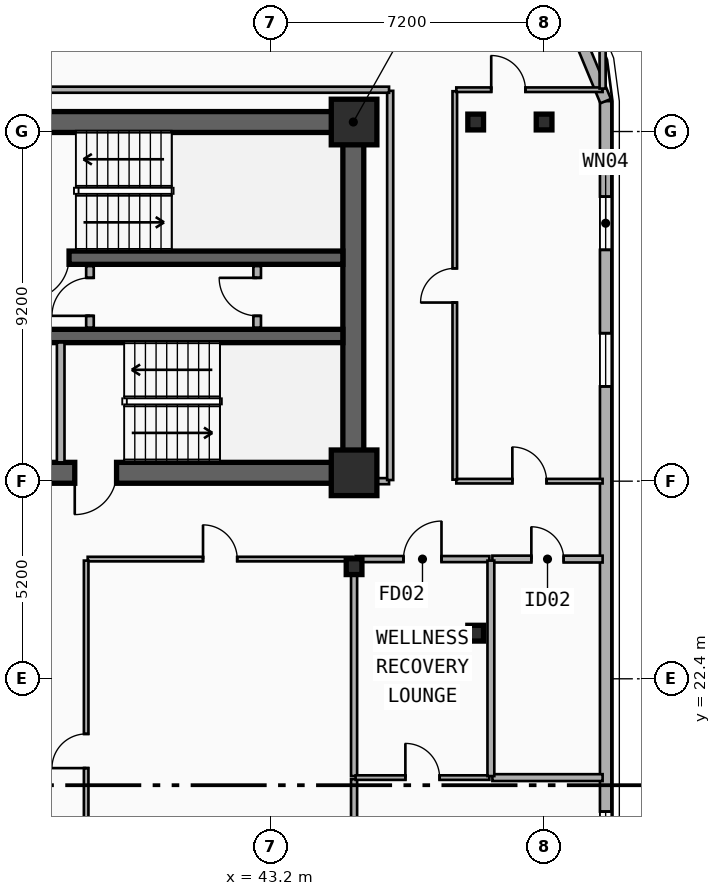
"""IFC4 building model, lengths in metres.
Left out: names, types, materials, properties, quantities, classifications, styles, units other than length and angle.
Written with IfcOpenShell. Run it as: python <this file> out.ifc"""

import sys

from ifc_helpers import new_model, si_unit, direction, frame, frame_2d, origin, origin_2d, place, context, subcontext, project, spatial, rectangle, i_section, extrude, element, fill, save


model = new_model("IFC4")
c1 = context("Model", 3, precision=1e-05, world=origin(), true_north=direction((0.0, 1.0)))
c2 = subcontext(c1, "Body", "Model", "MODEL_VIEW")
j1 = project(units=[si_unit("LENGTHUNIT", "METRE"), si_unit("PLANEANGLEUNIT", "RADIAN")], contexts=[c1])
p1 = place(None, origin())
s1 = spatial("IfcSite", under=j1, at=p1, CompositionType="ELEMENT")
p2 = place(p1, origin())
s2 = spatial("IfcBuilding", under=s1, at=p2, CompositionType="ELEMENT")
p3 = place(p2, frame((0.0, 0.0, 151.9)))
s3 = spatial("IfcBuildingStorey", under=s2, at=p3, CompositionType="ELEMENT", Elevation=151.9)
p4 = place(p3, frame((12.15, 37.05, 0.0), z_axis=(0.0, 0.0, 1.0), x_axis=(1.0, 0.0, 0.0)))
e1 = element("IfcWall", 1, at=p4, inside=s3, PredefinedType="SHEAR", context=c2, shape_type="SweptSolid", body=[
    extrude(rectangle(XDim=33.23, YDim=0.55, at=frame_2d((16.615, 0.0))), origin(), (0.0, 0.0, 1.0), 3.55),
])
p5 = place(p3, frame((45.38, 27.82, 0.0), z_axis=(0.0, 0.0, 1.0), x_axis=(-1.0, 0.0, 0.0)))
e2 = element("IfcWall", 2, at=p5, inside=s3, PredefinedType="SHEAR", context=c2, shape_type="SweptSolid", body=[
    extrude(rectangle(XDim=12.23, YDim=0.55, at=frame_2d((6.115, 0.0))), origin(), (0.0, 0.0, 1.0), 3.55),
])
p6 = place(p5, frame((9.93, 0.0, 0.0)))
e3 = element("IfcOpeningElement", 3, at=p6, cuts=e2, PredefinedType="OPENING", context=c2, shape_type="SweptSolid", body=[
    extrude(rectangle(XDim=1.1, YDim=2.15, at=frame_2d((0.55, 1.075))), frame((0.0, 0.285, 0.0), z_axis=(0.0, -1.0, 0.0), x_axis=(1.0, 0.0, 0.0)), (0.0, 0.0, 1.0), 0.57),
])
p7 = place(p5, frame((6.23, 0.0, 0.0)))
e4 = element("IfcOpeningElement", 4, at=p7, cuts=e2, PredefinedType="OPENING", context=c2, shape_type="SweptSolid", body=[
    extrude(rectangle(XDim=1.1, YDim=2.15, at=frame_2d((0.55, 1.075))), frame((0.0, 0.285, 0.0), z_axis=(0.0, -1.0, 0.0), x_axis=(1.0, 0.0, 0.0)), (0.0, 0.0, 1.0), 0.57),
])
p8 = place(p3, frame((45.38, 28.095, 0.0), z_axis=(0.0, 0.0, 1.0), x_axis=(0.0, 1.0, 0.0)))
e5 = element("IfcWall", 5, at=p8, inside=s3, PredefinedType="SHEAR", context=c2, shape_type="SweptSolid", body=[
    extrude(rectangle(XDim=8.68, YDim=0.55, at=frame_2d((4.34, 0.0))), origin(), (0.0, 0.0, 1.0), 3.55),
])
p9 = place(p3, frame((45.105, 33.48, 0.0), z_axis=(0.0, 0.0, 1.0), x_axis=(-1.0, 0.0, 0.0)))
e6 = element("IfcWall", 6, at=p9, inside=s3, PredefinedType="SHEAR", context=c2, shape_type="SweptSolid", body=[
    extrude(rectangle(XDim=8.55, YDim=0.35, at=frame_2d((4.275, 0.0))), origin(), (0.0, 0.0, 1.0), 3.55),
])
p10 = place(p9, frame((7.205, 0.0, 0.0)))
e7 = element("IfcOpeningElement", 7, at=p10, cuts=e6, PredefinedType="OPENING", context=c2, shape_type="SweptSolid", body=[
    extrude(rectangle(XDim=1.1, YDim=2.15, at=frame_2d((0.55, 1.075))), frame((0.0, 0.185, 0.0), z_axis=(0.0, -1.0, 0.0), x_axis=(1.0, 0.0, 0.0)), (0.0, 0.0, 1.0), 0.37),
])
p11 = place(p3, frame((36.555, 31.42, 0.0), z_axis=(0.0, 0.0, 1.0), x_axis=(1.0, 0.0, 0.0)))
e8 = element("IfcWall", 8, at=p11, inside=s3, PredefinedType="SHEAR", context=c2, shape_type="SweptSolid", body=[
    extrude(rectangle(XDim=8.55, YDim=0.35, at=frame_2d((4.275, 0.0))), origin(), (0.0, 0.0, 1.0), 3.55),
])
for number, where, z_axis, x_axis in (
    (9, (45.4, 27.82, 0.0), (0.0, 0.0, 1.0), (1.0, 0.0, 0.0)),
    (10, (45.4, 37.05, 0.0), (0.0, 0.0, 1.0), (1.0, 0.0, 0.0)),
):
    element("IfcColumn", number, at=place(p3, frame(where, z_axis=z_axis, x_axis=x_axis)), inside=s3, PredefinedType="COLUMN", context=c2, shape_type="SweptSolid", body=[
        extrude(rectangle(XDim=1.2, YDim=1.2, at=origin_2d()), origin(), (0.0, 0.0, 1.0), 3.55),
    ])
for number, where, z_axis, x_axis in (
    (11, (45.4, 25.35, 0.0), (0.0, 0.0, 1.0), (1.0, 0.0, 0.0)),
    (12, (48.6, 23.6, 0.0), (0.0, 0.0, 1.0), (1.0, 0.0, 0.0)),
    (13, (48.6, 37.05, 0.0), (0.0, 0.0, 1.0), (1.0, 0.0, 0.0)),
    (14, (50.4, 37.05, 0.0), (0.0, 0.0, 1.0), (1.0, 0.0, 0.0)),
):
    element("IfcColumn", number, at=place(p3, frame(where, z_axis=z_axis, x_axis=x_axis)), inside=s3, PredefinedType="COLUMN", context=c2, shape_type="SweptSolid", body=[
        extrude(i_section(OverallWidth=0.413, OverallDepth=0.415, WebThickness=0.03, FlangeThickness=0.047, FilletRadius=0.015, at=origin_2d()), origin(), (0.0, 0.0, 1.0), 3.55),
    ])
p12 = place(p3, frame((52.02, 37.6, 0.0), z_axis=(0.0, 0.0, 1.0), x_axis=(0.0, -1.0, 0.0)))
e15 = element("IfcWall", 15, at=p12, inside=s3, PredefinedType="SOLIDWALL", context=c2, shape_type="SweptSolid", body=[
    extrude(rectangle(XDim=23.0, YDim=0.3, at=frame_2d((11.5, 0.0))), origin(), (0.0, 0.0, 1.0), 3.29),
])
p13 = place(p12, frame((2.513, 0.0, 0.34)))
e16 = element("IfcOpeningElement", 16, at=p13, cuts=e15, PredefinedType="OPENING", context=c2, shape_type="SweptSolid", body=[
    extrude(rectangle(XDim=1.4, YDim=2.1, at=frame_2d((0.7, 1.05))), frame((0.0, 0.16, 0.0), z_axis=(0.0, -1.0, 0.0), x_axis=(1.0, 0.0, 0.0)), (0.0, 0.0, 1.0), 0.32),
])
p14 = place(p12, frame((6.107, 0.0, 0.34)))
e17 = element("IfcOpeningElement", 17, at=p14, cuts=e15, PredefinedType="OPENING", context=c2, shape_type="SweptSolid", body=[
    extrude(rectangle(XDim=1.4, YDim=2.1, at=frame_2d((0.7, 1.05))), frame((0.0, 0.16, 0.0), z_axis=(0.0, -1.0, 0.0), x_axis=(1.0, 0.0, 0.0)), (0.0, 0.0, 1.0), 0.32),
])
p15 = place(p12, frame((18.693, 0.0, 0.34)))
e18 = element("IfcOpeningElement", 18, at=p15, cuts=e15, PredefinedType="OPENING", context=c2, shape_type="SweptSolid", body=[
    extrude(rectangle(XDim=1.4, YDim=2.1, at=frame_2d((0.7, 1.05))), frame((0.0, 0.16, 0.0), z_axis=(0.0, -1.0, 0.0), x_axis=(1.0, 0.0, 0.0)), (0.0, 0.0, 1.0), 0.32),
])
p16 = place(p12, frame((20.687, 0.0, 0.34)))
e19 = element("IfcOpeningElement", 19, at=p16, cuts=e15, PredefinedType="OPENING", context=c2, shape_type="SweptSolid", body=[
    extrude(rectangle(XDim=1.4, YDim=2.1, at=frame_2d((0.7, 1.05))), frame((0.0, 0.16, 0.0), z_axis=(0.0, -1.0, 0.0), x_axis=(1.0, 0.0, 0.0)), (0.0, 0.0, 1.0), 0.32),
])
p17 = place(p3, frame((50.843, 40.443, 0.0), z_axis=(0.0, 0.0, 1.0), x_axis=(0.382704529509, -0.923870793506, 0.0)))
e20 = element("IfcWall", 20, at=p17, inside=s3, PredefinedType="SOLIDWALL", context=c2, shape_type="SweptSolid", body=[
    extrude(rectangle(XDim=3.077, YDim=0.3, at=frame_2d((1.538, 0.0))), origin(), (0.0, 0.0, 1.0), 3.29),
])
p18 = place(p3, frame((37.68, 28.095, 0.0), z_axis=(0.0, 0.0, 1.0), x_axis=(0.0, 1.0, 0.0)))
e21 = element("IfcWall", 21, at=p18, inside=s3, PredefinedType="PARTITIONING", context=c2, shape_type="SweptSolid", body=[
    extrude(rectangle(XDim=3.155, YDim=0.2, at=frame_2d((1.578, 0.0))), origin(), (0.0, 0.0, 1.0), 2.67),
])
p19 = place(p3, frame((38.45, 31.64, 0.0), z_axis=(0.0, 0.0, 1.0), x_axis=(0.0, 1.0, 0.0)))
e22 = element("IfcWall", 22, at=p19, inside=s3, PredefinedType="PARTITIONING", context=c2, shape_type="SweptSolid", body=[
    extrude(rectangle(XDim=1.62, YDim=0.2, at=frame_2d((0.81, 0.0))), origin(), (0.0, 0.0, 1.0), 3.29),
])
p20 = place(p19, frame((0.31, 0.0, 0.0)))
e23 = element("IfcOpeningElement", 23, at=p20, cuts=e22, PredefinedType="OPENING", context=c2, shape_type="SweptSolid", body=[
    extrude(rectangle(XDim=1.0, YDim=2.15, at=frame_2d((0.5, 1.075))), frame((0.0, 0.11, 0.0), z_axis=(0.0, -1.0, 0.0), x_axis=(1.0, 0.0, 0.0)), (0.0, 0.0, 1.0), 0.22),
])
p21 = place(p3, frame((42.85, 31.64, 0.0), z_axis=(0.0, 0.0, 1.0), x_axis=(0.0, 1.0, 0.0)))
e24 = element("IfcWall", 24, at=p21, inside=s3, PredefinedType="PARTITIONING", context=c2, shape_type="SweptSolid", body=[
    extrude(rectangle(XDim=1.62, YDim=0.2, at=frame_2d((0.81, 0.0))), origin(), (0.0, 0.0, 1.0), 3.29),
])
p22 = place(p21, frame((0.31, 0.0, 0.0)))
e25 = element("IfcOpeningElement", 25, at=p22, cuts=e24, PredefinedType="OPENING", context=c2, shape_type="SweptSolid", body=[
    extrude(rectangle(XDim=1.0, YDim=2.15, at=frame_2d((0.5, 1.075))), frame((0.0, 0.11, 0.0), z_axis=(0.0, -1.0, 0.0), x_axis=(1.0, 0.0, 0.0)), (0.0, 0.0, 1.0), 0.22),
])
p23 = place(p3, frame((48.09, 27.6, 0.0), z_axis=(0.0, 0.0, 1.0), x_axis=(1.0, 0.0, 0.0)))
e26 = element("IfcWall", 26, at=p23, inside=s3, PredefinedType="PARTITIONING", context=c2, shape_type="SweptSolid", body=[
    extrude(rectangle(XDim=3.85, YDim=0.12, at=frame_2d((1.925, 0.0))), origin(), (0.0, 0.0, 1.0), 2.62),
])
p24 = place(p23, frame((1.475, 0.0, 0.0)))
e27 = element("IfcOpeningElement", 27, at=p24, cuts=e26, PredefinedType="OPENING", context=c2, shape_type="SweptSolid", body=[
    extrude(rectangle(XDim=0.9, YDim=2.1, at=frame_2d((0.45, 1.05))), frame((0.0, 0.07, 0.0), z_axis=(0.0, -1.0, 0.0), x_axis=(1.0, 0.0, 0.0)), (0.0, 0.0, 1.0), 0.14),
])
p25 = place(p3, frame((38.39, 25.55, 0.0), z_axis=(0.0, 0.0, 1.0), x_axis=(1.0, 0.0, 0.0)))
e28 = element("IfcWall", 28, at=p25, inside=s3, PredefinedType="PARTITIONING", context=c2, shape_type="SweptSolid", body=[
    extrude(rectangle(XDim=6.97, YDim=0.12, at=frame_2d((3.485, 0.0))), origin(), (0.0, 0.0, 1.0), 2.36),
])
p26 = place(p25, frame((3.035, 0.0, 0.0)))
e29 = element("IfcOpeningElement", 29, at=p26, cuts=e28, PredefinedType="OPENING", context=c2, shape_type="SweptSolid", body=[
    extrude(rectangle(XDim=0.9, YDim=2.1, at=frame_2d((0.45, 1.05))), frame((0.0, 0.07, 0.0), z_axis=(0.0, -1.0, 0.0), x_axis=(1.0, 0.0, 0.0)), (0.0, 0.0, 1.0), 0.14),
])
p27 = place(p3, frame((45.44, 25.55, 0.0), z_axis=(0.0, 0.0, 1.0), x_axis=(1.0, 0.0, 0.0)))
e30 = element("IfcWall", 30, at=p27, inside=s3, PredefinedType="PARTITIONING", context=c2, shape_type="SweptSolid", body=[
    extrude(rectangle(XDim=3.52, YDim=0.16, at=frame_2d((1.76, 0.0))), origin(), (0.0, 0.0, 1.0), 2.36),
])
p28 = place(p27, frame((1.26, 0.0, 0.0)))
e31 = element("IfcOpeningElement", 31, at=p28, cuts=e30, PredefinedType="OPENING", context=c2, shape_type="SweptSolid", body=[
    extrude(rectangle(XDim=1.0, YDim=2.15, at=frame_2d((0.5, 1.075))), frame((0.0, 0.09, 0.0), z_axis=(0.0, -1.0, 0.0), x_axis=(1.0, 0.0, 0.0)), (0.0, 0.0, 1.0), 0.18),
])
p29 = place(p3, frame((49.04, 25.55, 0.0), z_axis=(0.0, 0.0, 1.0), x_axis=(1.0, 0.0, 0.0)))
e32 = element("IfcWall", 32, at=p29, inside=s3, PredefinedType="PLUMBINGWALL", context=c2, shape_type="SweptSolid", body=[
    extrude(rectangle(XDim=2.9, YDim=0.18, at=frame_2d((1.45, 0.0))), origin(), (0.0, 0.0, 1.0), 2.62),
])
p30 = place(p29, frame((1.025, 0.0, 0.0)))
e33 = element("IfcOpeningElement", 33, at=p30, cuts=e32, PredefinedType="OPENING", context=c2, shape_type="SweptSolid", body=[
    extrude(rectangle(XDim=0.85, YDim=2.1, at=frame_2d((0.425, 1.05))), frame((0.0, 0.1, 0.0), z_axis=(0.0, -1.0, 0.0), x_axis=(1.0, 0.0, 0.0)), (0.0, 0.0, 1.0), 0.2),
])
p31 = place(p3, frame((48.05, 27.64, 0.0), z_axis=(0.0, 0.0, 1.0), x_axis=(0.0, 1.0, 0.0)))
e34 = element("IfcWall", 34, at=p31, inside=s3, PredefinedType="PARTITIONING", context=c2, shape_type="SweptSolid", body=[
    extrude(rectangle(XDim=10.22, YDim=0.12, at=frame_2d((5.11, 0.0))), origin(), (0.0, 0.0, 1.0), 2.77),
])
p32 = place(p31, frame((4.66, 0.0, 0.0)))
e35 = element("IfcOpeningElement", 35, at=p32, cuts=e34, PredefinedType="OPENING", context=c2, shape_type="SweptSolid", body=[
    extrude(rectangle(XDim=0.9, YDim=2.1, at=frame_2d((0.45, 1.05))), frame((0.0, 0.07, 0.0), z_axis=(0.0, -1.0, 0.0), x_axis=(1.0, 0.0, 0.0)), (0.0, 0.0, 1.0), 0.14),
])
p33 = place(p3, frame((48.09, 37.9, 0.0), z_axis=(0.0, 0.0, 1.0), x_axis=(1.0, 0.0, 0.0)))
e36 = element("IfcWall", 36, at=p33, inside=s3, PredefinedType="PARTITIONING", context=c2, shape_type="SweptSolid", body=[
    extrude(rectangle(XDim=3.85, YDim=0.12, at=frame_2d((1.925, 0.0))), origin(), (0.0, 0.0, 1.0), 3.29),
])
p34 = place(p33, frame((0.919, 0.0, 0.0)))
e37 = element("IfcOpeningElement", 37, at=p34, cuts=e36, PredefinedType="OPENING", context=c2, shape_type="SweptSolid", body=[
    extrude(rectangle(XDim=0.9, YDim=2.1, at=frame_2d((0.45, 1.05))), frame((0.0, 0.07, 0.0), z_axis=(0.0, -1.0, 0.0), x_axis=(1.0, 0.0, 0.0)), (0.0, 0.0, 1.0), 0.14),
])
p35 = place(p3, frame((38.35, 15.49, 0.0), z_axis=(0.0, 0.0, 1.0), x_axis=(0.0, 1.0, 0.0)))
e38 = element("IfcWall", 38, at=p35, inside=s3, PredefinedType="PARTITIONING", context=c2, shape_type="SweptSolid", body=[
    extrude(rectangle(XDim=10.02, YDim=0.12, at=frame_2d((5.01, 0.0))), origin(), (0.0, 0.0, 1.0), 2.72),
])
p36 = place(p35, frame((4.56, 0.0, 0.0)))
e39 = element("IfcOpeningElement", 39, at=p36, cuts=e38, PredefinedType="OPENING", context=c2, shape_type="SweptSolid", body=[
    extrude(rectangle(XDim=0.9, YDim=2.1, at=frame_2d((0.45, 1.05))), frame((0.0, 0.07, 0.0), z_axis=(0.0, -1.0, 0.0), x_axis=(1.0, 0.0, 0.0)), (0.0, 0.0, 1.0), 0.14),
])
p37 = place(p3, frame((45.4, 10.66, 0.0), z_axis=(0.0, 0.0, 1.0), x_axis=(0.0, 1.0, 0.0)))
e40 = element("IfcWall", 40, at=p37, inside=s3, PredefinedType="PARTITIONING", context=c2, shape_type="SweptSolid", body=[
    extrude(rectangle(XDim=9.1, YDim=0.16, at=frame_2d((4.55, 0.0))), origin(), (0.0, 0.0, 1.0), 2.36),
])
p38 = place(p3, frame((45.4, 19.84, 0.0), z_axis=(0.0, 0.0, 1.0), x_axis=(0.0, 1.0, 0.0)))
e41 = element("IfcWall", 41, at=p38, inside=s3, PredefinedType="PARTITIONING", context=c2, shape_type="SweptSolid", body=[
    extrude(rectangle(XDim=5.67, YDim=0.16, at=frame_2d((2.835, 0.0))), origin(), (0.0, 0.0, 1.0), 2.36),
])
p39 = place(p3, frame((45.44, 19.8, 0.0), z_axis=(0.0, 0.0, 1.0), x_axis=(1.0, 0.0, 0.0)))
e42 = element("IfcWall", 42, at=p39, inside=s3, PredefinedType="PARTITIONING", context=c2, shape_type="SweptSolid", body=[
    extrude(rectangle(XDim=3.52, YDim=0.12, at=frame_2d((1.76, 0.0))), origin(), (0.0, 0.0, 1.0), 2.36),
])
p40 = place(p39, frame((1.31, 0.0, 0.0)))
e43 = element("IfcOpeningElement", 43, at=p40, cuts=e42, PredefinedType="OPENING", context=c2, shape_type="SweptSolid", body=[
    extrude(rectangle(XDim=0.9, YDim=2.1, at=frame_2d((0.45, 1.05))), frame((0.0, 0.07, 0.0), z_axis=(0.0, -1.0, 0.0), x_axis=(1.0, 0.0, 0.0)), (0.0, 0.0, 1.0), 0.14),
])
p41 = place(p3, frame((49.04, 19.8, 0.0), z_axis=(0.0, 0.0, 1.0), x_axis=(1.0, 0.0, 0.0)))
e44 = element("IfcWall", 44, at=p41, inside=s3, PredefinedType="PLUMBINGWALL", context=c2, shape_type="SweptSolid", body=[
    extrude(rectangle(XDim=2.9, YDim=0.18, at=frame_2d((1.45, 0.0))), origin(), (0.0, 0.0, 1.0), 2.62),
])
p42 = place(p3, frame((49.0, 19.84, 0.0), z_axis=(0.0, 0.0, 1.0), x_axis=(0.0, 1.0, 0.0)))
e45 = element("IfcWall", 45, at=p42, inside=s3, PredefinedType="PLUMBINGWALL", context=c2, shape_type="SweptSolid", body=[
    extrude(rectangle(XDim=5.67, YDim=0.18, at=frame_2d((2.835, 0.0))), origin(), (0.0, 0.0, 1.0), 2.77),
])
p43 = place(p3, frame((45.41, 27.6, 0.0), z_axis=(0.0, 0.0, 1.0), x_axis=(1.0, 0.0, 0.0)))
e46 = element("IfcWall", 46, at=p43, inside=s3, PredefinedType="PARTITIONING", context=c2, shape_type="SweptSolid", body=[
    extrude(rectangle(XDim=0.91, YDim=0.16, at=frame_2d((0.455, 0.0))), origin(), (0.0, 0.0, 1.0), 2.36),
])
p44 = place(p3, frame((46.35, 27.63, 0.0), z_axis=(0.0, 0.0, 1.0), x_axis=(0.0, 1.0, 0.0)))
e47 = element("IfcWall", 47, at=p44, inside=s3, PredefinedType="PARTITIONING", context=c2, shape_type="SweptSolid", body=[
    extrude(rectangle(XDim=10.24, YDim=0.16, at=frame_2d((5.12, 0.0))), origin(), (0.0, 0.0, 1.0), 2.77),
])
p45 = place(p3, frame((11.28, 37.9, 0.0), z_axis=(0.0, 0.0, 1.0), x_axis=(1.0, 0.0, 0.0)))
e48 = element("IfcWall", 48, at=p45, inside=s3, PredefinedType="PARTITIONING", context=c2, shape_type="SweptSolid", body=[
    extrude(rectangle(XDim=35.04, YDim=0.16, at=frame_2d((17.52, 0.0))), origin(), (0.0, 0.0, 1.0), 3.29),
])
p46 = place(p3, frame((51.94, 37.93, 0.0), z_axis=(0.0, 0.0, 1.0), x_axis=(0.0, 1.0, 0.0)))
e49 = element("IfcWall", 49, at=p46, inside=s3, PredefinedType="PARTITIONING", context=c2, shape_type="SweptSolid", body=[
    extrude(rectangle(XDim=1.44, YDim=0.16, at=frame_2d((0.72, 0.0))), origin(), (0.0, 0.0, 1.0), 3.29),
])
p47 = place(p13, origin())
e50 = element("IfcWindow", 50, at=p47, inside=s3, PartitioningType="SINGLE_PANEL", PredefinedType="WINDOW", context=c2, shape_type="SweptSolid", body=[
    extrude(rectangle(XDim=1.4, YDim=2.1, at=frame_2d((0.7, 1.05))), frame((0.0, 0.03, 0.0), z_axis=(0.0, -1.0, 0.0), x_axis=(1.0, 0.0, 0.0)), (0.0, 0.0, 1.0), 0.06),
])
fill(e16, e50)
p48 = place(p14, origin())
e51 = element("IfcWindow", 51, at=p48, inside=s3, PartitioningType="SINGLE_PANEL", PredefinedType="WINDOW", context=c2, shape_type="SweptSolid", body=[
    extrude(rectangle(XDim=1.4, YDim=2.1, at=frame_2d((0.7, 1.05))), frame((0.0, 0.03, 0.0), z_axis=(0.0, -1.0, 0.0), x_axis=(1.0, 0.0, 0.0)), (0.0, 0.0, 1.0), 0.06),
])
fill(e17, e51)
p49 = place(p15, origin())
e52 = element("IfcWindow", 52, at=p49, inside=s3, PartitioningType="SINGLE_PANEL", PredefinedType="WINDOW", context=c2, shape_type="SweptSolid", body=[
    extrude(rectangle(XDim=1.4, YDim=2.1, at=frame_2d((0.7, 1.05))), frame((0.0, 0.03, 0.0), z_axis=(0.0, -1.0, 0.0), x_axis=(1.0, 0.0, 0.0)), (0.0, 0.0, 1.0), 0.06),
])
fill(e18, e52)
p50 = place(p10, origin())
e53 = element("IfcDoor", 53, at=p50, inside=s3, OperationType="SINGLE_SWING_RIGHT", PredefinedType="DOOR", context=c2, shape_type="SweptSolid", body=[
    extrude(rectangle(XDim=1.1, YDim=2.15, at=frame_2d((0.55, 1.075))), frame((0.0, 0.025, 0.0), z_axis=(0.0, -1.0, 0.0), x_axis=(1.0, 0.0, 0.0)), (0.0, 0.0, 1.0), 0.05),
])
fill(e7, e53)
p51 = place(p7, origin())
e54 = element("IfcDoor", 54, at=p51, inside=s3, OperationType="SINGLE_SWING_RIGHT", PredefinedType="DOOR", context=c2, shape_type="SweptSolid", body=[
    extrude(rectangle(XDim=1.1, YDim=2.15, at=frame_2d((0.55, 1.075))), frame((0.0, 0.025, 0.0), z_axis=(0.0, -1.0, 0.0), x_axis=(1.0, 0.0, 0.0)), (0.0, 0.0, 1.0), 0.05),
])
fill(e4, e54)
p52 = place(p20, origin())
e55 = element("IfcDoor", 55, at=p52, inside=s3, OperationType="SINGLE_SWING_LEFT", PredefinedType="DOOR", context=c2, shape_type="SweptSolid", body=[
    extrude(rectangle(XDim=1.0, YDim=2.15, at=frame_2d((0.5, 1.075))), frame((0.0, 0.025, 0.0), z_axis=(0.0, -1.0, 0.0), x_axis=(1.0, 0.0, 0.0)), (0.0, 0.0, 1.0), 0.05),
])
fill(e23, e55)
p53 = place(p22, origin())
e56 = element("IfcDoor", 56, at=p53, inside=s3, OperationType="SINGLE_SWING_RIGHT", PredefinedType="DOOR", context=c2, shape_type="SweptSolid", body=[
    extrude(rectangle(XDim=1.0, YDim=2.15, at=frame_2d((0.5, 1.075))), frame((0.0, 0.025, 0.0), z_axis=(0.0, -1.0, 0.0), x_axis=(1.0, 0.0, 0.0)), (0.0, 0.0, 1.0), 0.05),
])
fill(e25, e56)
p54 = place(p24, origin())
e57 = element("IfcDoor", 57, at=p54, inside=s3, OperationType="SINGLE_SWING_LEFT", PredefinedType="DOOR", context=c2, shape_type="SweptSolid", body=[
    extrude(rectangle(XDim=0.9, YDim=2.1, at=frame_2d((0.45, 1.05))), frame((0.0, 0.025, 0.0), z_axis=(0.0, -1.0, 0.0), x_axis=(1.0, 0.0, 0.0)), (0.0, 0.0, 1.0), 0.05),
])
fill(e27, e57)
p55 = place(p26, origin())
e58 = element("IfcDoor", 58, at=p55, inside=s3, OperationType="SINGLE_SWING_LEFT", PredefinedType="DOOR", context=c2, shape_type="SweptSolid", body=[
    extrude(rectangle(XDim=0.9, YDim=2.1, at=frame_2d((0.45, 1.05))), frame((0.0, 0.025, 0.0), z_axis=(0.0, -1.0, 0.0), x_axis=(1.0, 0.0, 0.0)), (0.0, 0.0, 1.0), 0.05),
])
fill(e29, e58)
p56 = place(p28, origin())
e59 = element("IfcDoor", 59, at=p56, inside=s3, OperationType="SINGLE_SWING_RIGHT", PredefinedType="DOOR", context=c2, shape_type="SweptSolid", body=[
    extrude(rectangle(XDim=1.0, YDim=2.15, at=frame_2d((0.5, 1.075))), frame((0.0, 0.025, 0.0), z_axis=(0.0, -1.0, 0.0), x_axis=(1.0, 0.0, 0.0)), (0.0, 0.0, 1.0), 0.05),
])
fill(e31, e59)
p57 = place(p30, origin())
e60 = element("IfcDoor", 60, at=p57, inside=s3, OperationType="SINGLE_SWING_LEFT", PredefinedType="DOOR", context=c2, shape_type="SweptSolid", body=[
    extrude(rectangle(XDim=0.85, YDim=2.1, at=frame_2d((0.425, 1.05))), frame((0.0, 0.025, 0.0), z_axis=(0.0, -1.0, 0.0), x_axis=(1.0, 0.0, 0.0)), (0.0, 0.0, 1.0), 0.05),
])
fill(e33, e60)
p58 = place(p32, origin())
e61 = element("IfcDoor", 61, at=p58, inside=s3, OperationType="SINGLE_SWING_LEFT", PredefinedType="DOOR", context=c2, shape_type="SweptSolid", body=[
    extrude(rectangle(XDim=0.9, YDim=2.1, at=frame_2d((0.45, 1.05))), frame((0.0, 0.025, 0.0), z_axis=(0.0, -1.0, 0.0), x_axis=(1.0, 0.0, 0.0)), (0.0, 0.0, 1.0), 0.05),
])
fill(e35, e61)
p59 = place(p34, origin())
e62 = element("IfcDoor", 62, at=p59, inside=s3, OperationType="SINGLE_SWING_LEFT", PredefinedType="DOOR", context=c2, shape_type="SweptSolid", body=[
    extrude(rectangle(XDim=0.9, YDim=2.1, at=frame_2d((0.45, 1.05))), frame((0.0, 0.025, 0.0), z_axis=(0.0, -1.0, 0.0), x_axis=(1.0, 0.0, 0.0)), (0.0, 0.0, 1.0), 0.05),
])
fill(e37, e62)
p60 = place(p36, origin())
e63 = element("IfcDoor", 63, at=p60, inside=s3, OperationType="SINGLE_SWING_LEFT", PredefinedType="DOOR", context=c2, shape_type="SweptSolid", body=[
    extrude(rectangle(XDim=0.9, YDim=2.1, at=frame_2d((0.45, 1.05))), frame((0.0, 0.025, 0.0), z_axis=(0.0, -1.0, 0.0), x_axis=(1.0, 0.0, 0.0)), (0.0, 0.0, 1.0), 0.05),
])
fill(e39, e63)
p61 = place(p40, origin())
e64 = element("IfcDoor", 64, at=p61, inside=s3, OperationType="SINGLE_SWING_LEFT", PredefinedType="DOOR", context=c2, shape_type="SweptSolid", body=[
    extrude(rectangle(XDim=0.9, YDim=2.1, at=frame_2d((0.45, 1.05))), frame((0.0, 0.025, 0.0), z_axis=(0.0, -1.0, 0.0), x_axis=(1.0, 0.0, 0.0)), (0.0, 0.0, 1.0), 0.05),
])
fill(e43, e64)
save(model, sys.argv[1])
